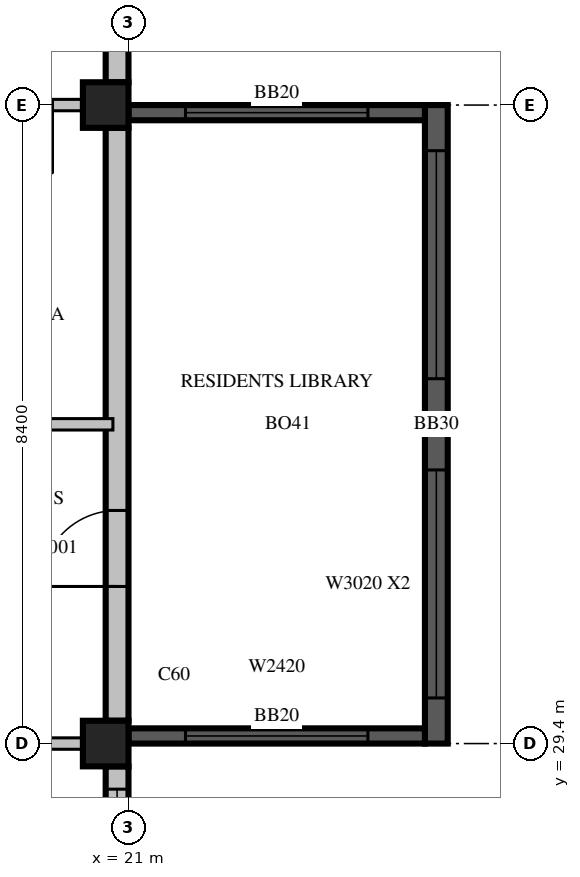
"""IFC4 building model, lengths in metres.
Left out: names, types, materials, properties, quantities, classifications, styles, units other than length and angle.
Written with IfcOpenShell. Run it as: python <this file> out.ifc"""

import sys

from ifc_helpers import new_model, si_unit, direction, frame, frame_2d, origin, origin_2d, place, context, subcontext, project, spatial, rectangle, extrude, source, transform, mapped, element, fill, save


model = new_model("IFC4")
c1 = context("Model", 3, precision=1e-05, world=origin(), true_north=direction((0.0, 1.0)))
c2 = subcontext(c1, "Body", "Model", "MODEL_VIEW")
j1 = project(units=[si_unit("LENGTHUNIT", "METRE"), si_unit("PLANEANGLEUNIT", "RADIAN")], contexts=[c1])
p1 = place(None, origin())
s1 = spatial("IfcSite", under=j1, at=p1, CompositionType="ELEMENT")
p2 = place(p1, origin())
s2 = spatial("IfcBuilding", under=s1, at=p2, CompositionType="ELEMENT")
p3 = place(p2, frame((0.0, 0.0, 340.5)))
s3 = spatial("IfcBuildingStorey", under=s2, at=p3, CompositionType="ELEMENT", Elevation=340.5)
m1 = source(origin(), c2, "Body", "SweptSolid", [
    extrude(rectangle(XDim=0.6, YDim=0.6, at=origin_2d()), origin(), (0.0, 0.0, 1.0), 3.5),
])
for number, where, z_axis, x_axis in (
    (1, (20.7, 29.4, 0.0), (0.0, 0.0, 1.0), (1.0, 0.0, 0.0)),
    (2, (20.7, 37.8, 0.0), (0.0, 0.0, 1.0), (1.0, 0.0, 0.0)),
):
    element("IfcColumn", number, at=place(p3, frame(where, z_axis=z_axis, x_axis=x_axis)), inside=s3, PredefinedType="COLUMN", context=c2, shape_type="MappedRepresentation", body=[
        mapped(m1, transform((0.0, 0.0, 0.0), scale=1.0)),
    ])
m2 = source(origin(), c2, "Body", "SweptSolid", [
    extrude(rectangle(XDim=7.5, YDim=0.3, at=frame_2d((3.75, 0.0))), origin(), (0.0, 0.0, 1.0), 3.1),
])
p4 = place(p3, frame((20.85, 21.6, 0.0), z_axis=(0.0, 0.0, 1.0), x_axis=(0.0, 1.0, 0.0)))
e3 = element("IfcWall", 3, at=p4, inside=s3, PredefinedType="STANDARD", context=c2, shape_type="MappedRepresentation", body=[
    mapped(m2, transform((0.0, 0.0, 0.0), scale=1.0)),
])
m3 = source(origin(), c2, "Body", "SweptSolid", [
    extrude(rectangle(XDim=1.8, YDim=2.0, at=frame_2d((0.9, 1.0))), frame((0.0, 0.16, 0.0), z_axis=(0.0, -1.0, 0.0), x_axis=(1.0, 0.0, 0.0)), (0.0, 0.0, 1.0), 0.32),
])
p5 = place(p4, frame((0.463, 0.0, 0.6)))
e4 = element("IfcOpeningElement", 4, at=p5, cuts=e3, PredefinedType="OPENING", context=c2, shape_type="MappedRepresentation", body=[
    mapped(m3, transform((0.0, 0.0, 0.0), scale=1.0)),
])
m4 = source(origin(), c2, "Body", "SweptSolid", [
    extrude(rectangle(XDim=3.0, YDim=2.0, at=frame_2d((1.5, 1.0))), frame((0.0, 0.16, 0.0), z_axis=(0.0, -1.0, 0.0), x_axis=(1.0, 0.0, 0.0)), (0.0, 0.0, 1.0), 0.32),
])
p6 = place(p4, frame((4.2, 0.0, 0.6)))
e5 = element("IfcOpeningElement", 5, at=p6, cuts=e3, PredefinedType="OPENING", context=c2, shape_type="MappedRepresentation", body=[
    mapped(m4, transform((0.0, 0.0, 0.0), scale=1.0)),
])
m5 = source(origin(), c2, "Body", "SweptSolid", [
    extrude(rectangle(XDim=7.8, YDim=0.3, at=frame_2d((3.9, 0.0))), origin(), (0.0, 0.0, 1.0), 3.1),
])
p7 = place(p3, frame((20.85, 29.7, 0.0), z_axis=(0.0, 0.0, 1.0), x_axis=(0.0, 1.0, 0.0)))
e6 = element("IfcWall", 6, at=p7, inside=s3, PredefinedType="STANDARD", context=c2, shape_type="MappedRepresentation", body=[
    mapped(m5, transform((0.0, 0.0, 0.0), scale=1.0)),
])
m6 = source(origin(), c2, "Body", "SweptSolid", [
    extrude(rectangle(XDim=1.0, YDim=2.1, at=frame_2d((0.5, 1.05))), frame((0.0, 0.16, 0.0), z_axis=(0.0, -1.0, 0.0), x_axis=(1.0, 0.0, 0.0)), (0.0, 0.0, 1.0), 0.32),
])
p8 = place(p7, frame((1.767, 0.0, 0.0)))
e7 = element("IfcOpeningElement", 7, at=p8, cuts=e6, PredefinedType="OPENING", context=c2, shape_type="MappedRepresentation", body=[
    mapped(m6, transform((0.0, 0.0, 0.0), scale=1.0)),
])
m7 = source(origin(), c2, "Body", "SweptSolid", [
    extrude(rectangle(XDim=5.58, YDim=0.3, at=frame_2d((2.79, 0.0))), origin(), (0.0, 0.0, 1.0), 3.1),
])
p9 = place(p3, frame((20.85, 38.1, 0.0), z_axis=(0.0, 0.0, 1.0), x_axis=(0.0, 1.0, 0.0)))
e8 = element("IfcWall", 8, at=p9, inside=s3, PredefinedType="STANDARD", context=c2, shape_type="MappedRepresentation", body=[
    mapped(m7, transform((0.0, 0.0, 0.0), scale=1.0)),
])
m8 = source(origin(), c2, "Body", "SweptSolid", [
    extrude(rectangle(XDim=3.6, YDim=2.0, at=frame_2d((1.8, 1.0))), frame((0.0, 0.16, 0.0), z_axis=(0.0, -1.0, 0.0), x_axis=(1.0, 0.0, 0.0)), (0.0, 0.0, 1.0), 0.32),
])
p10 = place(p9, frame((0.84, 0.0, 0.6)))
e9 = element("IfcOpeningElement", 9, at=p10, cuts=e8, PredefinedType="OPENING", context=c2, shape_type="MappedRepresentation", body=[
    mapped(m8, transform((0.0, 0.0, 0.0), scale=1.0)),
])
m9 = source(origin(), c2, "Body", "SweptSolid", [
    extrude(rectangle(XDim=8.4, YDim=0.3, at=frame_2d((4.2, 0.0))), origin(), (0.0, 0.0, 1.0), 3.09),
])
p11 = place(p3, frame((25.05, 29.4, 0.0), z_axis=(0.0, 0.0, 1.0), x_axis=(0.0, 1.0, 0.0)))
e10 = element("IfcWall", 10, at=p11, inside=s3, PredefinedType="SOLIDWALL", context=c2, shape_type="MappedRepresentation", body=[
    mapped(m9, transform((0.0, 0.0, 0.0), scale=1.0)),
])
p12 = place(p11, frame((0.6, 0.0, 0.6)))
e11 = element("IfcOpeningElement", 11, at=p12, cuts=e10, PredefinedType="OPENING", context=c2, shape_type="MappedRepresentation", body=[
    mapped(m4, transform((0.0, 0.0, 0.0), scale=1.0)),
])
p13 = place(p11, frame((4.8, 0.0, 0.6)))
e12 = element("IfcOpeningElement", 12, at=p13, cuts=e10, PredefinedType="OPENING", context=c2, shape_type="MappedRepresentation", body=[
    mapped(m4, transform((0.0, 0.0, 0.0), scale=1.0)),
])
m10 = source(origin(), c2, "Body", "SweptSolid", [
    extrude(rectangle(XDim=3.9, YDim=0.2, at=frame_2d((1.95, 0.0))), origin(), (0.0, 0.0, 1.0), 3.09),
])
p14 = place(p3, frame((21.0, 29.5, 0.0), z_axis=(0.0, 0.0, 1.0), x_axis=(1.0, 0.0, 0.0)))
e13 = element("IfcWall", 13, at=p14, inside=s3, PredefinedType="SOLIDWALL", context=c2, shape_type="MappedRepresentation", body=[
    mapped(m10, transform((0.0, 0.0, 0.0), scale=1.0)),
])
m11 = source(origin(), c2, "Body", "SweptSolid", [
    extrude(rectangle(XDim=2.4, YDim=2.0, at=frame_2d((1.2, 1.0))), frame((0.0, 0.11, 0.0), z_axis=(0.0, -1.0, 0.0), x_axis=(1.0, 0.0, 0.0)), (0.0, 0.0, 1.0), 0.22),
])
p15 = place(p14, frame((0.75, 0.0, 0.6)))
e14 = element("IfcOpeningElement", 14, at=p15, cuts=e13, PredefinedType="OPENING", context=c2, shape_type="MappedRepresentation", body=[
    mapped(m11, transform((0.0, 0.0, 0.0), scale=1.0)),
])
p16 = place(p3, frame((21.0, 37.7, 0.0), z_axis=(0.0, 0.0, 1.0), x_axis=(1.0, 0.0, 0.0)))
e15 = element("IfcWall", 15, at=p16, inside=s3, PredefinedType="SOLIDWALL", context=c2, shape_type="MappedRepresentation", body=[
    mapped(m10, transform((0.0, 0.0, 0.0), scale=1.0)),
])
p17 = place(p16, frame((0.75, 0.0, 0.6)))
e16 = element("IfcOpeningElement", 16, at=p17, cuts=e15, PredefinedType="OPENING", context=c2, shape_type="MappedRepresentation", body=[
    mapped(m11, transform((0.0, 0.0, 0.0), scale=1.0)),
])
p18 = place(p3, frame((12.805, 29.4, 0.0), z_axis=(0.0, 0.0, 1.0), x_axis=(1.0, 0.0, 0.0)))
e17 = element("IfcWall", 17, at=p18, inside=s3, PredefinedType="PARTITIONING", context=c2, shape_type="SweptSolid", body=[
    extrude(rectangle(XDim=7.596, YDim=0.15, at=frame_2d((3.798, 0.0))), origin(), (0.0, 0.0, 1.0), 3.1),
])
m12 = source(origin(), c2, "Body", "SweptSolid", [
    extrude(rectangle(XDim=1.2, YDim=2.1, at=frame_2d((0.6, 1.05))), frame((0.0, 0.085, 0.0), z_axis=(0.0, -1.0, 0.0), x_axis=(1.0, 0.0, 0.0)), (0.0, 0.0, 1.0), 0.17),
])
p19 = place(p18, frame((5.383, 0.0, 0.0)))
e18 = element("IfcOpeningElement", 18, at=p19, cuts=e17, PredefinedType="OPENING", context=c2, shape_type="MappedRepresentation", body=[
    mapped(m12, transform((0.0, 0.0, 0.0), scale=1.0)),
])
m13 = source(origin(), c2, "Body", "SweptSolid", [
    extrude(rectangle(XDim=9.995, YDim=0.15, at=frame_2d((4.997, 0.0))), origin(), (0.0, 0.0, 1.0), 3.1),
])
p20 = place(p3, frame((10.8, 33.6, 0.0), z_axis=(0.0, 0.0, 1.0), x_axis=(1.0, 0.0, 0.0)))
e19 = element("IfcWall", 19, at=p20, inside=s3, PredefinedType="PARTITIONING", context=c2, shape_type="MappedRepresentation", body=[
    mapped(m13, transform((0.0, 0.0, 0.0), scale=1.0)),
])
p21 = place(p20, frame((6.5, 0.0, 0.0)))
e20 = element("IfcOpeningElement", 20, at=p21, cuts=e19, PredefinedType="OPENING", context=c2, shape_type="MappedRepresentation", body=[
    mapped(m12, transform((0.0, 0.0, 0.0), scale=1.0)),
])
m14 = source(origin(), c2, "Body", "SweptSolid", [
    extrude(rectangle(XDim=9.302, YDim=0.15, at=frame_2d((4.651, 0.0))), origin(), (0.0, 0.0, 1.0), 3.1),
])
p22 = place(p3, frame((20.401, 37.8, 0.0), z_axis=(0.0, 0.0, 1.0), x_axis=(-1.0, 0.0, 0.0)))
e21 = element("IfcWall", 21, at=p22, inside=s3, PredefinedType="PARTITIONING", context=c2, shape_type="MappedRepresentation", body=[
    mapped(m14, transform((0.0, 0.0, 0.0), scale=1.0)),
])
m15 = source(origin(), c2, "Body", "SweptSolid", [
    extrude(rectangle(XDim=0.9, YDim=2.1, at=frame_2d((0.45, 1.05))), frame((0.0, 0.085, 0.0), z_axis=(0.0, -1.0, 0.0), x_axis=(1.0, 0.0, 0.0)), (0.0, 0.0, 1.0), 0.17),
])
p23 = place(p22, frame((0.401, 0.0, 0.0)))
e22 = element("IfcOpeningElement", 22, at=p23, cuts=e21, PredefinedType="OPENING", context=c2, shape_type="MappedRepresentation", body=[
    mapped(m15, transform((0.0, 0.0, 0.0), scale=1.0)),
])
m16 = source(origin(), c2, "Body", "SweptSolid", [
    extrude(rectangle(XDim=3.0, YDim=2.0, at=frame_2d((1.5, 1.0))), frame((0.0, 0.03, 0.0), z_axis=(0.0, -1.0, 0.0), x_axis=(1.0, 0.0, 0.0)), (0.0, 0.0, 1.0), 0.06),
])
p24 = place(p6, origin())
e23 = element("IfcWindow", 23, at=p24, inside=s3, PartitioningType="SINGLE_PANEL", PredefinedType="WINDOW", context=c2, shape_type="MappedRepresentation", body=[
    mapped(m16, transform((0.0, 0.0, 0.0), scale=1.0)),
])
fill(e5, e23)
p25 = place(p12, origin())
e24 = element("IfcWindow", 24, at=p25, inside=s3, PartitioningType="SINGLE_PANEL", PredefinedType="WINDOW", context=c2, shape_type="MappedRepresentation", body=[
    mapped(m16, transform((0.0, 0.0, 0.0), scale=1.0)),
])
fill(e11, e24)
p26 = place(p13, origin())
e25 = element("IfcWindow", 25, at=p26, inside=s3, PartitioningType="SINGLE_PANEL", PredefinedType="WINDOW", context=c2, shape_type="MappedRepresentation", body=[
    mapped(m16, transform((0.0, 0.0, 0.0), scale=1.0)),
])
fill(e12, e25)
m17 = source(origin(), c2, "Body", "SweptSolid", [
    extrude(rectangle(XDim=2.4, YDim=2.0, at=frame_2d((1.2, 1.0))), frame((0.0, 0.03, 0.0), z_axis=(0.0, -1.0, 0.0), x_axis=(1.0, 0.0, 0.0)), (0.0, 0.0, 1.0), 0.06),
])
p27 = place(p15, origin())
e26 = element("IfcWindow", 26, at=p27, inside=s3, PartitioningType="SINGLE_PANEL", PredefinedType="WINDOW", context=c2, shape_type="MappedRepresentation", body=[
    mapped(m17, transform((0.0, 0.0, 0.0), scale=1.0)),
])
fill(e14, e26)
p28 = place(p17, origin())
e27 = element("IfcWindow", 27, at=p28, inside=s3, PartitioningType="SINGLE_PANEL", PredefinedType="WINDOW", context=c2, shape_type="MappedRepresentation", body=[
    mapped(m17, transform((0.0, 0.0, 0.0), scale=1.0)),
])
fill(e16, e27)
m18 = source(origin(), c2, "Body", "SweptSolid", [
    extrude(rectangle(XDim=1.0, YDim=2.1, at=frame_2d((0.5, 1.05))), frame((0.0, 0.025, 0.0), z_axis=(0.0, -1.0, 0.0), x_axis=(1.0, 0.0, 0.0)), (0.0, 0.0, 1.0), 0.05),
])
p29 = place(p8, origin())
e28 = element("IfcDoor", 28, at=p29, inside=s3, OperationType="SINGLE_SWING_LEFT", PredefinedType="DOOR", context=c2, shape_type="MappedRepresentation", body=[
    mapped(m18, transform((0.0, 0.0, 0.0), scale=1.0)),
])
fill(e7, e28)
save(model, sys.argv[1])
